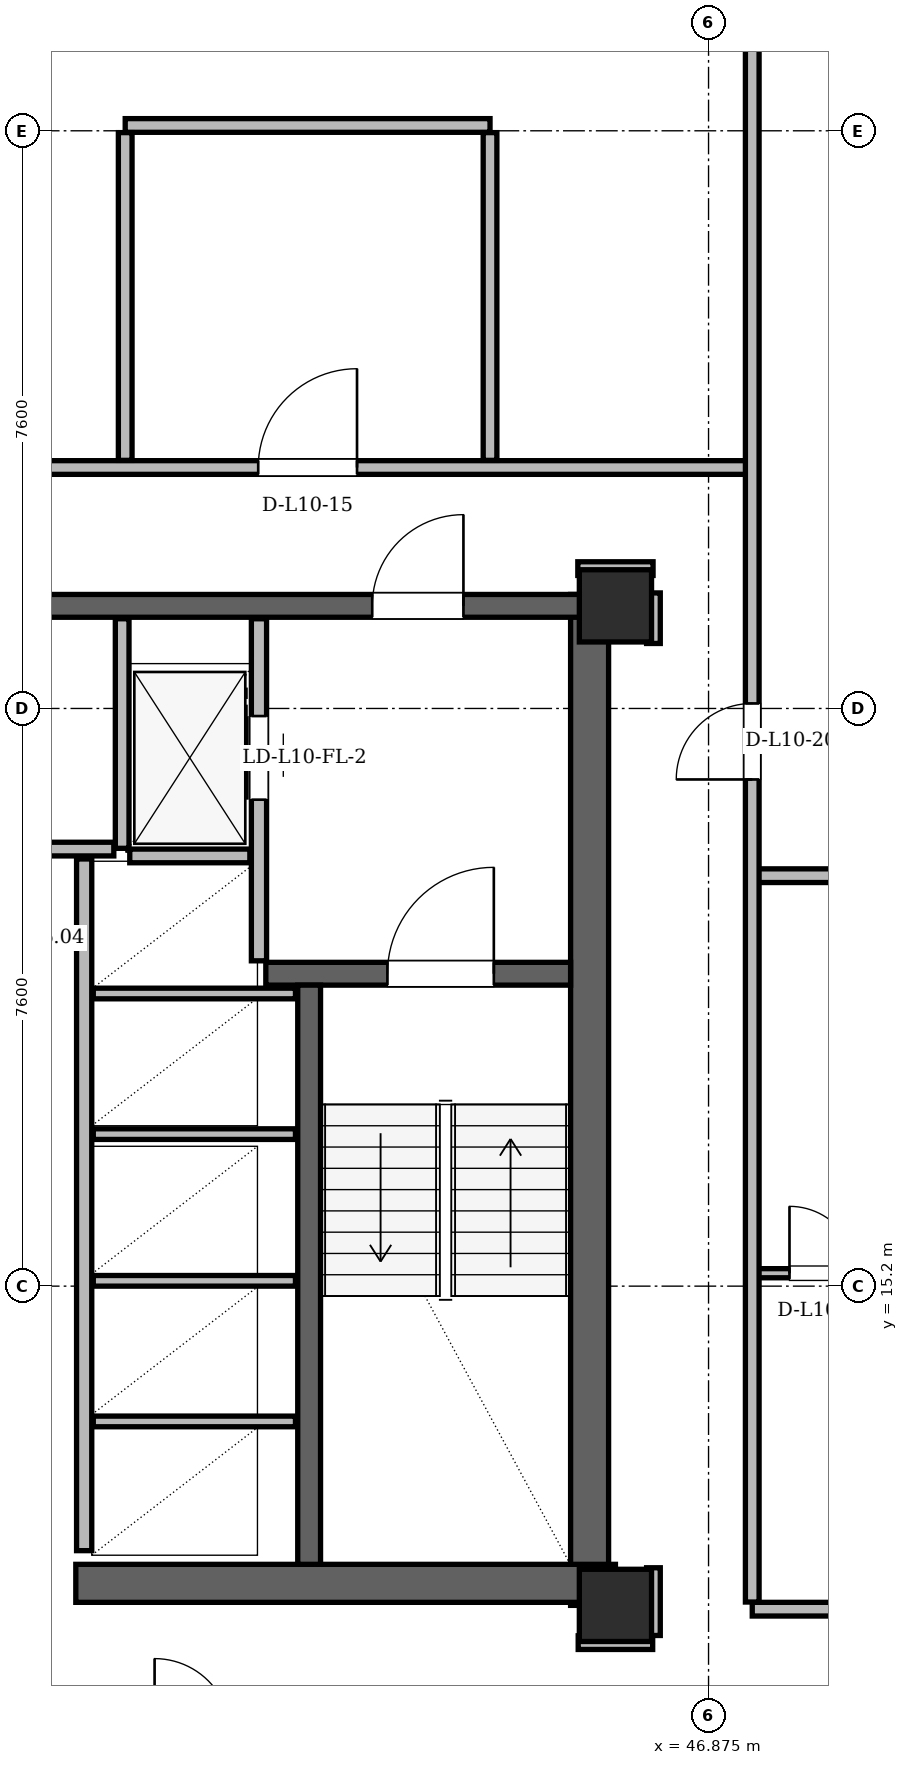
"""IFC4 building model, lengths in metres.
Left out: names, types, materials, properties, quantities, classifications, styles, units other than length and angle.
Written with IfcOpenShell. Run it as: python <this file> out.ifc"""

import sys

from ifc_helpers import new_model, si_unit, direction, frame, frame_2d, origin, origin_2d, place, context, subcontext, project, spatial, rectangle, hollow_rectangle, extrude, element, fill, save


model = new_model("IFC4")
c1 = context("Model", 3, precision=1e-05, world=origin(), true_north=direction((0.0, 1.0)))
c2 = subcontext(c1, "Body", "Model", "MODEL_VIEW")
j1 = project(units=[si_unit("LENGTHUNIT", "METRE"), si_unit("PLANEANGLEUNIT", "RADIAN")], contexts=[c1])
p1 = place(None, origin())
s1 = spatial("IfcSite", under=j1, at=p1, CompositionType="ELEMENT")
p2 = place(p1, origin())
s2 = spatial("IfcBuilding", under=s1, at=p2, CompositionType="ELEMENT")
p3 = place(p2, frame((0.0, 0.0, 41.7)))
s3 = spatial("IfcBuildingStorey", under=s2, at=p3, CompositionType="ELEMENT", Elevation=41.7)
for number, where, z_axis, x_axis in (
    (1, (45.65, 11.0, 0.0), (0.0, 0.0, 1.0), (1.0, 0.0, 0.0)),
    (2, (45.65, 24.15, 0.0), (0.0, 0.0, 1.0), (1.0, 0.0, 0.0)),
):
    element("IfcColumn", number, at=place(p3, frame(where, z_axis=z_axis, x_axis=x_axis)), inside=s3, PredefinedType="COLUMN", context=c2, shape_type="SweptSolid", body=[
        extrude(hollow_rectangle(XDim=0.95, YDim=0.95, WallThickness=0.08, at=origin_2d()), origin(), (0.0, 0.0, 1.0), 3.6),
    ])
p4 = place(p3, frame((45.31, 11.0, 0.0), z_axis=(0.0, 0.0, 1.0), x_axis=(0.0, 1.0, 0.0)))
e3 = element("IfcWall", 3, at=p4, inside=s3, PredefinedType="SHEAR", context=c2, shape_type="SweptSolid", body=[
    extrude(rectangle(XDim=13.3, YDim=0.5, at=frame_2d((6.65, 0.0))), origin(), (0.0, 0.0, 1.0), 3.36),
])
p5 = place(p3, frame((38.55, 11.29, 0.0), z_axis=(0.0, 0.0, 1.0), x_axis=(1.0, 0.0, 0.0)))
e4 = element("IfcWall", 4, at=p5, inside=s3, PredefinedType="SHEAR", context=c2, shape_type="SweptSolid", body=[
    extrude(rectangle(XDim=7.1, YDim=0.5, at=frame_2d((3.55, 0.0))), origin(), (0.0, 0.0, 1.0), 3.36),
])
p6 = place(p3, frame((29.65, 24.15, 0.0), z_axis=(0.0, 0.0, 1.0), x_axis=(1.0, 0.0, 0.0)))
e5 = element("IfcWall", 5, at=p6, inside=s3, PredefinedType="SHEAR", context=c2, shape_type="SweptSolid", body=[
    extrude(rectangle(XDim=15.7, YDim=0.3, at=frame_2d((7.85, 0.0))), origin(), (0.0, 0.0, 1.0), 3.36),
])
p7 = place(p6, frame((1.7, 0.0, 0.0)))
e6 = element("IfcOpeningElement", 6, at=p7, cuts=e5, PredefinedType="OPENING", context=c2, shape_type="SweptSolid", body=[
    extrude(rectangle(XDim=1.2, YDim=2.2, at=frame_2d((0.6, 1.1))), frame((0.0, 0.15, 0.0), z_axis=(0.0, -1.0, 0.0), x_axis=(1.0, 0.0, 0.0)), (0.0, 0.0, 1.0), 0.3),
])
p8 = place(p6, frame((12.8, 0.0, 0.0)))
e7 = element("IfcOpeningElement", 7, at=p8, cuts=e5, PredefinedType="OPENING", context=c2, shape_type="SweptSolid", body=[
    extrude(rectangle(XDim=1.2, YDim=2.2, at=frame_2d((0.6, 1.1))), frame((0.0, 0.15, 0.0), z_axis=(0.0, -1.0, 0.0), x_axis=(1.0, 0.0, 0.0)), (0.0, 0.0, 1.0), 0.3),
])
p9 = place(p6, frame((7.4, 0.0, 0.0)))
e8 = element("IfcOpeningElement", 8, at=p9, cuts=e5, PredefinedType="OPENING", context=c2, shape_type="SweptSolid", body=[
    extrude(rectangle(XDim=0.9, YDim=2.05, at=frame_2d((0.45, 1.025))), frame((0.0, 0.15, 0.0), z_axis=(0.0, -1.0, 0.0), x_axis=(1.0, 0.0, 0.0)), (0.0, 0.0, 1.0), 0.3),
])
p10 = place(p3, frame((41.05, 19.31, 0.0), z_axis=(0.0, 0.0, 1.0), x_axis=(1.0, 0.0, 0.0)))
e9 = element("IfcWall", 9, at=p10, inside=s3, PredefinedType="SHEAR", context=c2, shape_type="SweptSolid", body=[
    extrude(rectangle(XDim=4.01, YDim=0.3, at=frame_2d((2.005, 0.0))), origin(), (0.0, 0.0, 1.0), 3.36),
])
p11 = place(p10, frame((1.6, 0.0, 0.0)))
e10 = element("IfcOpeningElement", 10, at=p11, cuts=e9, PredefinedType="OPENING", context=c2, shape_type="SweptSolid", body=[
    extrude(rectangle(XDim=1.4, YDim=2.2, at=frame_2d((0.7, 1.1))), frame((0.0, 0.15, 0.0), z_axis=(0.0, -1.0, 0.0), x_axis=(1.0, 0.0, 0.0)), (0.0, 0.0, 1.0), 0.3),
])
p12 = place(p3, frame((41.62, 11.54, 0.0), z_axis=(0.0, 0.0, 1.0), x_axis=(0.0, 1.0, 0.0)))
e11 = element("IfcWall", 11, at=p12, inside=s3, PredefinedType="SHEAR", context=c2, shape_type="SweptSolid", body=[
    extrude(rectangle(XDim=7.62, YDim=0.3, at=frame_2d((3.81, 0.0))), origin(), (0.0, 0.0, 1.0), 3.36),
])
p13 = place(p3, frame((61.648, 14.921, 0.0), z_axis=(0.0, 0.0, 1.0), x_axis=(-0.500002585961, 0.866023910774, 0.0)))
e12 = element("IfcWall", 12, at=p13, inside=s3, PredefinedType="SOLIDWALL", context=c2, shape_type="SweptSolid", body=[
    extrude(rectangle(XDim=33.118, YDim=0.34, at=frame_2d((16.559, 0.0))), origin(), (0.0, 0.0, 1.0), 2.494),
])
p14 = place(p13, frame((7.0, 0.0, 0.0)))
e13 = element("IfcOpeningElement", 13, at=p14, cuts=e12, PredefinedType="OPENING", context=c2, shape_type="SweptSolid", body=[
    extrude(rectangle(XDim=1.5, YDim=2.2, at=frame_2d((0.75, 1.1))), frame((0.0, 0.17, 0.0), z_axis=(0.0, -1.0, 0.0), x_axis=(1.0, 0.0, 0.0)), (0.0, 0.0, 1.0), 0.34),
])
p15 = place(p13, frame((24.004, 0.0, 0.0)))
e14 = element("IfcOpeningElement", 14, at=p15, cuts=e12, PredefinedType="OPENING", context=c2, shape_type="SweptSolid", body=[
    extrude(rectangle(XDim=1.5, YDim=2.2, at=frame_2d((0.75, 1.1))), frame((0.0, 0.17, 0.0), z_axis=(0.0, -1.0, 0.0), x_axis=(1.0, 0.0, 0.0)), (0.0, 0.0, 1.0), 0.34),
])
p16 = place(p13, frame((1.324, 0.0, 0.85)))
e15 = element("IfcOpeningElement", 15, at=p16, cuts=e12, PredefinedType="OPENING", context=c2, shape_type="SweptSolid", body=[
    extrude(rectangle(XDim=2.5, YDim=1.534, at=frame_2d((1.25, 0.767))), frame((0.0, 0.17, 0.0), z_axis=(0.0, -1.0, 0.0), x_axis=(1.0, 0.0, 0.0)), (0.0, 0.0, 1.0), 0.34),
])
p17 = place(p13, frame((17.011, 0.0, 0.85)))
e16 = element("IfcOpeningElement", 16, at=p17, cuts=e12, PredefinedType="OPENING", context=c2, shape_type="SweptSolid", body=[
    extrude(rectangle(XDim=2.8, YDim=1.534, at=frame_2d((1.4, 0.767))), frame((0.0, 0.17, 0.0), z_axis=(0.0, -1.0, 0.0), x_axis=(1.0, 0.0, 0.0)), (0.0, 0.0, 1.0), 0.34),
])
p18 = place(p13, frame((25.84, 0.0, 0.85)))
e17 = element("IfcOpeningElement", 17, at=p18, cuts=e12, PredefinedType="OPENING", context=c2, shape_type="SweptSolid", body=[
    extrude(rectangle(XDim=1.2, YDim=1.48, at=frame_2d((0.6, 0.74))), frame((0.0, 0.17, 0.0), z_axis=(0.0, -1.0, 0.0), x_axis=(1.0, 0.0, 0.0)), (0.0, 0.0, 1.0), 0.34),
])
p19 = place(p13, frame((10.758, 0.0, 0.85)))
e18 = element("IfcOpeningElement", 18, at=p19, cuts=e12, PredefinedType="OPENING", context=c2, shape_type="SweptSolid", body=[
    extrude(rectangle(XDim=1.2, YDim=1.48, at=frame_2d((0.6, 0.74))), frame((0.0, 0.17, 0.0), z_axis=(0.0, -1.0, 0.0), x_axis=(1.0, 0.0, 0.0)), (0.0, 0.0, 1.0), 0.34),
])
p20 = place(p13, frame((13.246, 0.0, 0.85)))
e19 = element("IfcOpeningElement", 19, at=p20, cuts=e12, PredefinedType="OPENING", context=c2, shape_type="SweptSolid", body=[
    extrude(rectangle(XDim=1.8, YDim=1.534, at=frame_2d((0.9, 0.767))), frame((0.0, 0.17, 0.0), z_axis=(0.0, -1.0, 0.0), x_axis=(1.0, 0.0, 0.0)), (0.0, 0.0, 1.0), 0.34),
])
p21 = place(p3, frame((40.96, 19.48, 0.0), z_axis=(0.0, 0.0, 1.0), x_axis=(0.0, 1.0, 0.0)))
e20 = element("IfcWall", 20, at=p21, inside=s3, PredefinedType="PARTITIONING", context=c2, shape_type="SweptSolid", body=[
    extrude(rectangle(XDim=4.5, YDim=0.2, at=frame_2d((2.25, 0.0))), origin(), (0.0, 0.0, 1.0), 2.4),
])
p22 = place(p21, frame((2.12, 0.0, 0.0)))
e21 = element("IfcOpeningElement", 21, at=p22, cuts=e20, PredefinedType="OPENING", context=c2, shape_type="SweptSolid", body=[
    extrude(rectangle(XDim=1.1, YDim=2.2, at=frame_2d((0.55, 1.1))), frame((0.0, 0.1, 0.0), z_axis=(0.0, -1.0, 0.0), x_axis=(1.0, 0.0, 0.0)), (0.0, 0.0, 1.0), 0.2),
])
p23 = place(p3, frame((39.16, 20.96, 0.0), z_axis=(0.0, 0.0, 1.0), x_axis=(0.0, 1.0, 0.0)))
e22 = element("IfcWall", 22, at=p23, inside=s3, PredefinedType="PARTITIONING", context=c2, shape_type="SweptSolid", body=[
    extrude(rectangle(XDim=3.02, YDim=0.18, at=frame_2d((1.51, 0.0))), origin(), (0.0, 0.0, 1.0), 2.4),
])
p24 = place(p3, frame((39.26, 20.86, 0.0), z_axis=(0.0, 0.0, 1.0), x_axis=(1.0, 0.0, 0.0)))
e23 = element("IfcWall", 23, at=p24, inside=s3, PredefinedType="PARTITIONING", context=c2, shape_type="SweptSolid", body=[
    extrude(rectangle(XDim=1.58, YDim=0.18, at=frame_2d((0.79, 0.0))), origin(), (0.0, 0.0, 1.0), 3.36),
])
p25 = place(p3, frame((38.66, 11.72, 0.0), z_axis=(0.0, 0.0, 1.0), x_axis=(0.0, 1.0, 0.0)))
e24 = element("IfcWall", 24, at=p25, inside=s3, PredefinedType="PARTITIONING", context=c2, shape_type="SweptSolid", body=[
    extrude(rectangle(XDim=9.1, YDim=0.2, at=frame_2d((4.55, 0.0))), origin(), (0.0, 0.0, 1.0), 3.36),
])
for number, where, z_axis, x_axis in (
    (25, (38.78, 13.42, 0.0), (0.0, 0.0, 1.0), (1.0, 0.0, 0.0)),
    (26, (38.78, 15.27, 0.0), (0.0, 0.0, 1.0), (1.0, 0.0, 0.0)),
    (27, (38.78, 17.2, 0.0), (0.0, 0.0, 1.0), (1.0, 0.0, 0.0)),
    (28, (38.78, 19.05, 0.0), (0.0, 0.0, 1.0), (1.0, 0.0, 0.0)),
):
    element("IfcWall", number, at=place(p3, frame(where, z_axis=z_axis, x_axis=x_axis)), inside=s3, PredefinedType="PARTITIONING", context=c2, shape_type="SweptSolid", body=[
        extrude(rectangle(XDim=2.66, YDim=0.14, at=frame_2d((1.33, 0.0))), origin(), (0.0, 0.0, 1.0), 3.36),
    ])
p26 = place(p3, frame((35.95, 20.95, 0.0), z_axis=(0.0, 0.0, 1.0), x_axis=(1.0, 0.0, 0.0)))
e29 = element("IfcWall", 29, at=p26, inside=s3, PredefinedType="PARTITIONING", context=c2, shape_type="SweptSolid", body=[
    extrude(rectangle(XDim=3.1, YDim=0.18, at=frame_2d((1.55, 0.0))), origin(), (0.0, 0.0, 1.0), 3.36),
])
p27 = place(p3, frame((45.16, 10.51, 0.0), z_axis=(0.0, 0.0, 1.0), x_axis=(1.0, 0.0, 0.0)))
e30 = element("IfcWall", 30, at=p27, inside=s3, PredefinedType="PARTITIONING", context=c2, shape_type="SweptSolid", body=[
    extrude(rectangle(XDim=0.98, YDim=0.18, at=frame_2d((0.49, 0.0))), origin(), (0.0, 0.0, 1.0), 2.738),
])
p28 = place(p3, frame((47.45, 10.95, 0.0), z_axis=(0.0, 0.0, 1.0), x_axis=(1.0, 0.0, 0.0)))
e31 = element("IfcWall", 31, at=p28, inside=s3, PredefinedType="PARTITIONING", context=c2, shape_type="SweptSolid", body=[
    extrude(rectangle(XDim=8.35, YDim=0.18, at=frame_2d((4.175, 0.0))), origin(), (0.0, 0.0, 1.0), 3.36),
])
p29 = place(p3, frame((47.4, 15.37, 0.0), z_axis=(0.0, 0.0, 1.0), x_axis=(1.0, 0.0, 0.0)))
e32 = element("IfcWall", 32, at=p29, inside=s3, PredefinedType="PARTITIONING", context=c2, shape_type="SweptSolid", body=[
    extrude(rectangle(XDim=13.788, YDim=0.12, at=frame_2d((6.894, 0.0))), origin(), (0.0, 0.0, 1.0), 2.946),
])
p30 = place(p29, frame((0.54, 0.0, 0.0)))
e33 = element("IfcOpeningElement", 33, at=p30, cuts=e32, PredefinedType="OPENING", context=c2, shape_type="SweptSolid", body=[
    extrude(rectangle(XDim=0.88, YDim=2.08, at=frame_2d((0.44, 1.04))), frame((0.0, 0.06, 0.0), z_axis=(0.0, -1.0, 0.0), x_axis=(1.0, 0.0, 0.0)), (0.0, 0.0, 1.0), 0.12),
])
p31 = place(p29, frame((2.531, 0.0, 0.0)))
e34 = element("IfcOpeningElement", 34, at=p31, cuts=e32, PredefinedType="OPENING", context=c2, shape_type="SweptSolid", body=[
    extrude(rectangle(XDim=0.95, YDim=2.1, at=frame_2d((0.475, 1.05))), frame((0.0, 0.06, 0.0), z_axis=(0.0, -1.0, 0.0), x_axis=(1.0, 0.0, 0.0)), (0.0, 0.0, 1.0), 0.12),
])
p32 = place(p29, frame((4.916, 0.0, 0.0)))
e35 = element("IfcOpeningElement", 35, at=p32, cuts=e32, PredefinedType="OPENING", context=c2, shape_type="SweptSolid", body=[
    extrude(rectangle(XDim=0.95, YDim=2.1, at=frame_2d((0.475, 1.05))), frame((0.0, 0.06, 0.0), z_axis=(0.0, -1.0, 0.0), x_axis=(1.0, 0.0, 0.0)), (0.0, 0.0, 1.0), 0.12),
])
p33 = place(p29, frame((7.961, 0.0, 0.0)))
e36 = element("IfcOpeningElement", 36, at=p33, cuts=e32, PredefinedType="OPENING", context=c2, shape_type="SweptSolid", body=[
    extrude(rectangle(XDim=0.92, YDim=2.12, at=frame_2d((0.46, 1.06))), frame((0.0, 0.06, 0.0), z_axis=(0.0, -1.0, 0.0), x_axis=(1.0, 0.0, 0.0)), (0.0, 0.0, 1.0), 0.12),
])
p34 = place(p29, frame((11.528, 0.0, 0.0)))
e37 = element("IfcOpeningElement", 37, at=p34, cuts=e32, PredefinedType="OPENING", context=c2, shape_type="SweptSolid", body=[
    extrude(rectangle(XDim=0.92, YDim=2.12, at=frame_2d((0.46, 1.06))), frame((0.0, 0.06, 0.0), z_axis=(0.0, -1.0, 0.0), x_axis=(1.0, 0.0, 0.0)), (0.0, 0.0, 1.0), 0.12),
])
p35 = place(p3, frame((47.45, 20.6, 0.0), z_axis=(0.0, 0.0, 1.0), x_axis=(1.0, 0.0, 0.0)))
e38 = element("IfcWall", 38, at=p35, inside=s3, PredefinedType="PARTITIONING", context=c2, shape_type="SweptSolid", body=[
    extrude(rectangle(XDim=10.719, YDim=0.18, at=frame_2d((5.359, 0.0))), origin(), (0.0, 0.0, 1.0), 2.494),
])
p36 = place(p3, frame((45.155, 24.64, 0.0), z_axis=(0.0, 0.0, 1.0), x_axis=(1.0, 0.0, 0.0)))
e39 = element("IfcWall", 39, at=p36, inside=s3, PredefinedType="PARTITIONING", context=c2, shape_type="SweptSolid", body=[
    extrude(rectangle(XDim=0.99, YDim=0.18, at=frame_2d((0.495, 0.0))), origin(), (0.0, 0.0, 1.0), 2.738),
])
p37 = place(p3, frame((27.55, 25.97, 0.0), z_axis=(0.0, 0.0, 1.0), x_axis=(1.0, 0.0, 0.0)))
e40 = element("IfcWall", 40, at=p37, inside=s3, PredefinedType="PARTITIONING", context=c2, shape_type="SweptSolid", body=[
    extrude(rectangle(XDim=19.9, YDim=0.18, at=frame_2d((9.95, 0.0))), origin(), (0.0, 0.0, 1.0), 2.738),
])
p38 = place(p37, frame((13.4, 0.0, 0.0)))
e41 = element("IfcOpeningElement", 41, at=p38, cuts=e40, PredefinedType="OPENING", context=c2, shape_type="SweptSolid", body=[
    extrude(rectangle(XDim=1.3, YDim=2.2, at=frame_2d((0.65, 1.1))), frame((0.0, 0.09, 0.0), z_axis=(0.0, -1.0, 0.0), x_axis=(1.0, 0.0, 0.0)), (0.0, 0.0, 1.0), 0.18),
])
p39 = place(p3, frame((39.2, 30.47, 0.0), z_axis=(0.0, 0.0, 1.0), x_axis=(1.0, 0.0, 0.0)))
e42 = element("IfcWall", 42, at=p39, inside=s3, PredefinedType="PARTITIONING", context=c2, shape_type="SweptSolid", body=[
    extrude(rectangle(XDim=4.8, YDim=0.18, at=frame_2d((2.4, 0.0))), origin(), (0.0, 0.0, 1.0), 3.36),
])
p40 = place(p3, frame((39.2, 26.064, 0.0), z_axis=(0.0, 0.0, 1.0), x_axis=(0.0, 1.0, 0.0)))
e43 = element("IfcWall", 43, at=p40, inside=s3, PredefinedType="PARTITIONING", context=c2, shape_type="SweptSolid", body=[
    extrude(rectangle(XDim=4.312, YDim=0.18, at=frame_2d((2.156, 0.0))), origin(), (0.0, 0.0, 1.0), 3.36),
])
p41 = place(p3, frame((44.0, 26.064, 0.0), z_axis=(0.0, 0.0, 1.0), x_axis=(0.0, 1.0, 0.0)))
e44 = element("IfcWall", 44, at=p41, inside=s3, PredefinedType="PARTITIONING", context=c2, shape_type="SweptSolid", body=[
    extrude(rectangle(XDim=4.312, YDim=0.18, at=frame_2d((2.156, 0.0))), origin(), (0.0, 0.0, 1.0), 2.946),
])
p42 = place(p3, frame((46.15, 10.604, 0.0), z_axis=(0.0, 0.0, 1.0), x_axis=(0.0, 1.0, 0.0)))
e45 = element("IfcWall", 45, at=p42, inside=s3, PredefinedType="PARTITIONING", context=c2, shape_type="SweptSolid", body=[
    extrude(rectangle(XDim=0.891, YDim=0.18, at=frame_2d((0.446, 0.0))), origin(), (0.0, 0.0, 1.0), 2.738),
])
p43 = place(p3, frame((46.15, 23.655, 0.0), z_axis=(0.0, 0.0, 1.0), x_axis=(0.0, 1.0, 0.0)))
e46 = element("IfcWall", 46, at=p43, inside=s3, PredefinedType="PARTITIONING", context=c2, shape_type="SweptSolid", body=[
    extrude(rectangle(XDim=0.665, YDim=0.18, at=frame_2d((0.333, 0.0))), origin(), (0.0, 0.0, 1.0), 3.36),
])
p44 = place(p3, frame((47.45, 11.044, 0.0), z_axis=(0.0, 0.0, 1.0), x_axis=(0.0, 1.0, 0.0)))
e47 = element("IfcWall", 47, at=p44, inside=s3, PredefinedType="PARTITIONING", context=c2, shape_type="SweptSolid", body=[
    extrude(rectangle(XDim=28.121, YDim=0.18, at=frame_2d((14.061, 0.0))), origin(), (0.0, 0.0, 1.0), 2.494),
])
p45 = place(p44, frame((10.822, 0.0, 0.0)))
e48 = element("IfcOpeningElement", 48, at=p45, cuts=e47, PredefinedType="OPENING", context=c2, shape_type="SweptSolid", body=[
    extrude(rectangle(XDim=1.0, YDim=2.18, at=frame_2d((0.5, 1.09))), frame((0.0, 0.09, 0.0), z_axis=(0.0, -1.0, 0.0), x_axis=(1.0, 0.0, 0.0)), (0.0, 0.0, 1.0), 0.18),
])
p46 = place(p22, origin())
e49 = element("IfcDoor", 49, at=p46, inside=s3, OperationType="SLIDING_TO_RIGHT", PredefinedType="DOOR", context=c2, shape_type="SweptSolid", body=[
    extrude(rectangle(XDim=1.1, YDim=2.2, at=frame_2d((0.55, 1.1))), frame((0.0, 0.025, 0.0), z_axis=(0.0, -1.0, 0.0), x_axis=(1.0, 0.0, 0.0)), (0.0, 0.0, 1.0), 0.05),
])
fill(e21, e49)
p47 = place(p11, origin())
e50 = element("IfcDoor", 50, at=p47, inside=s3, OperationType="SINGLE_SWING_RIGHT", PredefinedType="DOOR", context=c2, shape_type="SweptSolid", body=[
    extrude(rectangle(XDim=1.4, YDim=2.2, at=frame_2d((0.7, 1.1))), frame((0.0, 0.025, 0.0), z_axis=(0.0, -1.0, 0.0), x_axis=(1.0, 0.0, 0.0)), (0.0, 0.0, 1.0), 0.05),
])
fill(e10, e50)
p48 = place(p8, origin())
e51 = element("IfcDoor", 51, at=p48, inside=s3, OperationType="SINGLE_SWING_RIGHT", PredefinedType="DOOR", context=c2, shape_type="SweptSolid", body=[
    extrude(rectangle(XDim=1.2, YDim=2.2, at=frame_2d((0.6, 1.1))), frame((0.0, 0.025, 0.0), z_axis=(0.0, -1.0, 0.0), x_axis=(1.0, 0.0, 0.0)), (0.0, 0.0, 1.0), 0.05),
])
fill(e7, e51)
p49 = place(p30, origin())
e52 = element("IfcDoor", 52, at=p49, inside=s3, OperationType="SINGLE_SWING_LEFT", PredefinedType="DOOR", context=c2, shape_type="SweptSolid", body=[
    extrude(rectangle(XDim=0.88, YDim=2.08, at=frame_2d((0.44, 1.04))), frame((0.0, 0.025, 0.0), z_axis=(0.0, -1.0, 0.0), x_axis=(1.0, 0.0, 0.0)), (0.0, 0.0, 1.0), 0.05),
])
fill(e33, e52)
p50 = place(p38, origin())
e53 = element("IfcDoor", 53, at=p50, inside=s3, OperationType="SINGLE_SWING_RIGHT", PredefinedType="DOOR", context=c2, shape_type="SweptSolid", body=[
    extrude(rectangle(XDim=1.3, YDim=2.2, at=frame_2d((0.65, 1.1))), frame((0.0, 0.025, 0.0), z_axis=(0.0, -1.0, 0.0), x_axis=(1.0, 0.0, 0.0)), (0.0, 0.0, 1.0), 0.05),
])
fill(e41, e53)
p51 = place(p45, origin())
e54 = element("IfcDoor", 54, at=p51, inside=s3, OperationType="SINGLE_SWING_LEFT", PredefinedType="DOOR", context=c2, shape_type="SweptSolid", body=[
    extrude(rectangle(XDim=1.0, YDim=2.18, at=frame_2d((0.5, 1.09))), frame((0.0, 0.025, 0.0), z_axis=(0.0, -1.0, 0.0), x_axis=(1.0, 0.0, 0.0)), (0.0, 0.0, 1.0), 0.05),
])
fill(e48, e54)
save(model, sys.argv[1])
